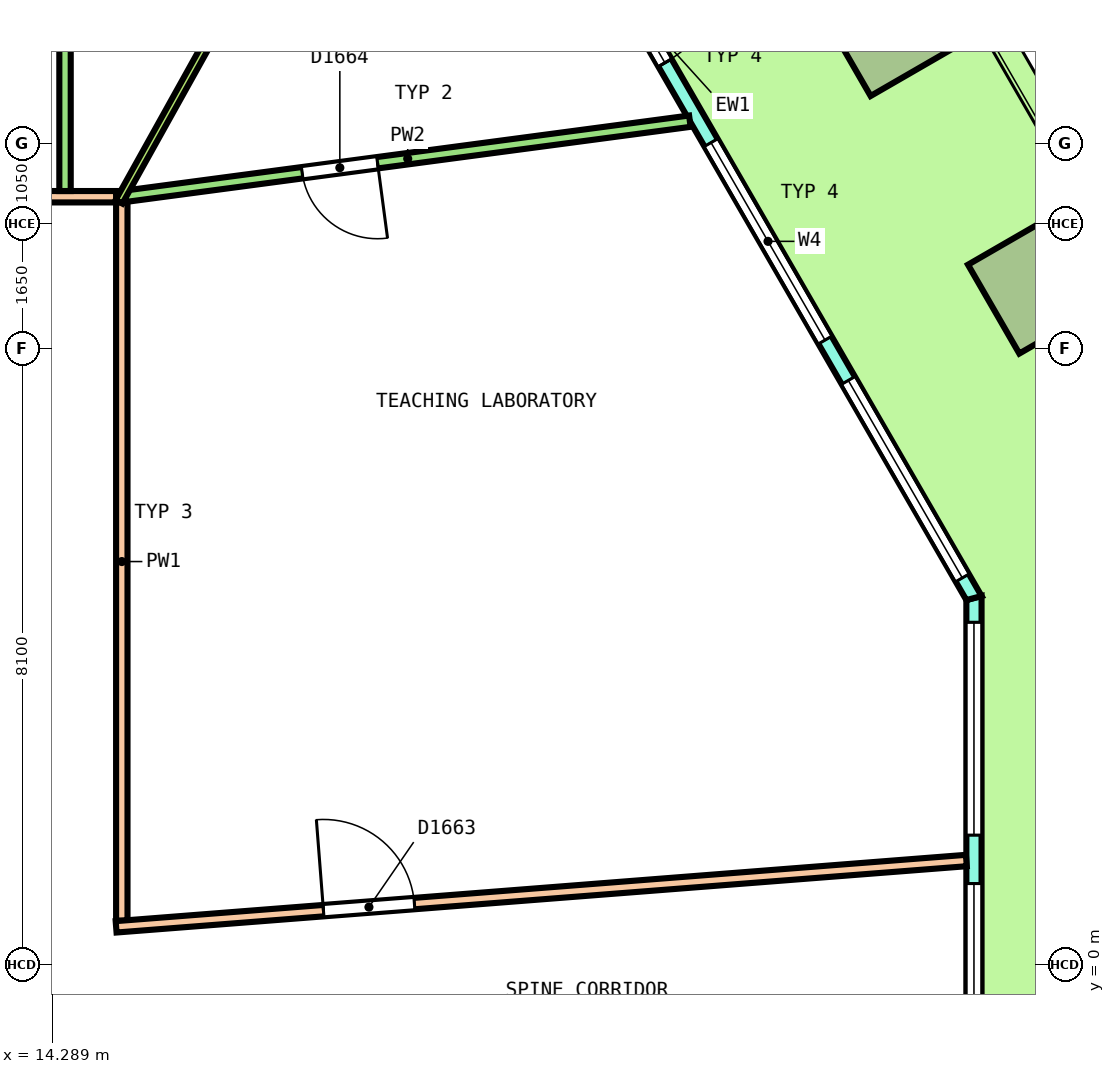
"""IFC4 building model, lengths in metres.
Left out: names, types, materials, properties, quantities, classifications, styles, units other than length and angle.
Written with IfcOpenShell. Run it as: python <this file> out.ifc"""

import sys

from ifc_helpers import new_model, si_unit, direction, frame, frame_2d, origin, origin_2d, place, context, subcontext, project, spatial, polyline, rectangle, outline, extrude, element, fill, save


model = new_model("IFC4")
c1 = context("Model", 3, precision=1e-05, world=origin(), true_north=direction((0.0, 1.0)))
c2 = subcontext(c1, "Body", "Model", "MODEL_VIEW")
j1 = project(units=[si_unit("LENGTHUNIT", "METRE"), si_unit("PLANEANGLEUNIT", "RADIAN")], contexts=[c1])
p1 = place(None, origin())
s1 = spatial("IfcSite", under=j1, at=p1, CompositionType="ELEMENT")
p2 = place(p1, origin())
s2 = spatial("IfcBuilding", under=s1, at=p2, CompositionType="ELEMENT")
p3 = place(p2, frame((0.0, 0.0, 130.8)))
s3 = spatial("IfcBuildingStorey", under=s2, at=p3, CompositionType="ELEMENT", Elevation=130.8)
for number, where, z_axis, x_axis in (
    (1, (27.255, 8.959, 0.0), (0.0, 0.0, 1.0), (-0.5, 0.866, 0.0)),
    (2, (25.299, 12.347, 0.0), (0.0, 0.0, 1.0), (-0.5, 0.866, 0.0)),
):
    element("IfcColumn", number, at=place(p3, frame(where, z_axis=z_axis, x_axis=x_axis)), inside=s3, PredefinedType="COLUMN", context=c2, shape_type="SweptSolid", body=[
        extrude(rectangle(XDim=1.35, YDim=1.35, at=origin_2d()), origin(), (0.0, 0.0, 1.0), 4.04),
    ])
p4 = place(p3, frame((26.411, -2.055, 0.0), z_axis=(0.0, 0.0, 1.0), x_axis=(0.0, 1.0, 0.0)))
e3 = element("IfcWall", 3, at=p4, inside=s3, PredefinedType="SOLIDWALL", context=c2, shape_type="SweptSolid", body=[
    extrude(outline(polyline([(-0.027, -0.1), (1.128, -0.1), (2.283, -0.1), (3.438, -0.1), (4.592, -0.1), (5.747, -0.1), (6.902, -0.1), (6.848, 0.1), (5.711, 0.1), (4.574, 0.1), (3.438, 0.1), (2.301, 0.1), (1.164, 0.1), (0.027, 0.1), (-0.027, -0.1)])), origin(), (0.0, 0.0, 1.0), 4.1),
])
p5 = place(p4, frame((0.319, 0.0, 0.1)))
e4 = element("IfcOpeningElement", 4, at=p5, cuts=e3, PredefinedType="OPENING", context=c2, shape_type="SweptSolid", body=[
    extrude(rectangle(XDim=2.8, YDim=2.9, at=frame_2d((1.4, 1.45))), frame((0.0, 0.11, 0.0), z_axis=(0.0, -1.0, 0.0), x_axis=(1.0, 0.0, 0.0)), (0.0, 0.0, 1.0), 0.22),
])
p6 = place(p4, frame((3.756, 0.0, 0.1)))
e5 = element("IfcOpeningElement", 5, at=p6, cuts=e3, PredefinedType="OPENING", context=c2, shape_type="SweptSolid", body=[
    extrude(rectangle(XDim=2.8, YDim=2.9, at=frame_2d((1.4, 1.45))), frame((0.0, 0.11, 0.0), z_axis=(0.0, -1.0, 0.0), x_axis=(1.0, 0.0, 0.0)), (0.0, 0.0, 1.0), 0.22),
])
p7 = place(p3, frame((26.411, 4.82, 0.0), z_axis=(0.0, 0.0, 1.0), x_axis=(-0.500000137386, 0.866025324465, 0.0)))
e6 = element("IfcWall", 6, at=p7, inside=s3, PredefinedType="SOLIDWALL", context=c2, shape_type="SweptSolid", body=[
    extrude(outline(polyline([(-0.027, -0.1), (0.979, -0.1), (1.986, -0.1), (2.992, -0.1), (3.999, -0.1), (5.005, -0.1), (6.012, -0.1), (7.018, -0.1), (8.025, -0.1), (9.031, -0.1), (10.038, -0.1), (11.044, -0.1), (12.051, -0.1), (13.057, -0.1), (14.063, -0.1), (15.07, -0.1), (16.076, -0.1), (17.083, -0.1), (18.089, -0.1), (18.036, 0.1), (17.035, 0.1), (16.035, 0.1), (15.034, 0.1), (14.034, 0.1), (13.033, 0.1), (12.033, 0.1), (11.032, 0.1), (10.032, 0.1), (9.031, 0.1), (8.031, 0.1), (7.03, 0.1), (6.03, 0.1), (5.029, 0.1), (4.029, 0.1), (3.028, 0.1), (2.028, 0.1), (1.027, 0.1), (0.027, 0.1), (-0.027, -0.1)])), origin(), (0.0, 0.0, 1.0), 4.1),
])
p8 = place(p7, frame((0.306, 0.0, 0.1)))
e7 = element("IfcOpeningElement", 7, at=p8, cuts=e6, PredefinedType="OPENING", context=c2, shape_type="SweptSolid", body=[
    extrude(rectangle(XDim=3.0, YDim=2.9, at=frame_2d((1.5, 1.45))), frame((0.0, 0.11, 0.0), z_axis=(0.0, -1.0, 0.0), x_axis=(1.0, 0.0, 0.0)), (0.0, 0.0, 1.0), 0.22),
])
p9 = place(p7, frame((3.919, 0.0, 0.1)))
e8 = element("IfcOpeningElement", 8, at=p9, cuts=e6, PredefinedType="OPENING", context=c2, shape_type="SweptSolid", body=[
    extrude(rectangle(XDim=3.0, YDim=2.9, at=frame_2d((1.5, 1.45))), frame((0.0, 0.11, 0.0), z_axis=(0.0, -1.0, 0.0), x_axis=(1.0, 0.0, 0.0)), (0.0, 0.0, 1.0), 0.22),
])
p10 = place(p7, frame((8.131, 0.0, 0.0)))
e9 = element("IfcOpeningElement", 9, at=p10, cuts=e6, PredefinedType="OPENING", context=c2, shape_type="SweptSolid", body=[
    extrude(rectangle(XDim=1.8, YDim=2.4, at=frame_2d((0.9, 1.2))), frame((0.0, 0.11, 0.0), z_axis=(0.0, -1.0, 0.0), x_axis=(1.0, 0.0, 0.0)), (0.0, 0.0, 1.0), 0.22),
])
p11 = place(p7, frame((8.131, 0.0, 2.55)))
e10 = element("IfcOpeningElement", 10, at=p11, cuts=e6, PredefinedType="OPENING", context=c2, shape_type="SweptSolid", body=[
    extrude(rectangle(XDim=1.8, YDim=0.45, at=frame_2d((0.9, 0.225))), frame((0.0, 0.11, 0.0), z_axis=(0.0, -1.0, 0.0), x_axis=(1.0, 0.0, 0.0)), (0.0, 0.0, 1.0), 0.22),
])
p12 = place(p7, frame((11.144, 0.0, 0.1)))
e11 = element("IfcOpeningElement", 11, at=p12, cuts=e6, PredefinedType="OPENING", context=c2, shape_type="SweptSolid", body=[
    extrude(rectangle(XDim=3.0, YDim=2.9, at=frame_2d((1.5, 1.45))), frame((0.0, 0.11, 0.0), z_axis=(0.0, -1.0, 0.0), x_axis=(1.0, 0.0, 0.0)), (0.0, 0.0, 1.0), 0.22),
])
p13 = place(p7, frame((14.756, 0.0, 0.1)))
e12 = element("IfcOpeningElement", 12, at=p13, cuts=e6, PredefinedType="OPENING", context=c2, shape_type="SweptSolid", body=[
    extrude(rectangle(XDim=3.0, YDim=2.9, at=frame_2d((1.5, 1.45))), frame((0.0, 0.11, 0.0), z_axis=(0.0, -1.0, 0.0), x_axis=(1.0, 0.0, 0.0)), (0.0, 0.0, 1.0), 0.22),
])
p14 = place(p3, frame((15.2, 0.576, 0.0), z_axis=(0.0, 0.0, 1.0), x_axis=(0.0, 1.0, 0.0)))
e13 = element("IfcWall", 13, at=p14, inside=s3, PredefinedType="PARTITIONING", context=c2, shape_type="SweptSolid", body=[
    extrude(rectangle(XDim=9.449, YDim=0.15, at=frame_2d((4.725, 0.0))), origin(), (0.0, 0.0, 1.0), 3.05),
])
p15 = place(p3, frame((-15.125, 10.1, 0.0), z_axis=(0.0, 0.0, 1.0), x_axis=(1.0, 0.0, 0.0)))
e14 = element("IfcWall", 14, at=p15, inside=s3, PredefinedType="PARTITIONING", context=c2, shape_type="SweptSolid", body=[
    extrude(rectangle(XDim=30.25, YDim=0.15, at=frame_2d((15.125, 0.0))), origin(), (0.0, 0.0, 1.0), 3.05),
])
p16 = place(p15, frame((16.895, 0.0, 0.0)))
e15 = element("IfcOpeningElement", 15, at=p16, cuts=e14, PredefinedType="OPENING", context=c2, shape_type="SweptSolid", body=[
    extrude(rectangle(XDim=1.2, YDim=2.1, at=frame_2d((0.6, 1.05))), frame((0.0, 0.085, 0.0), z_axis=(0.0, -1.0, 0.0), x_axis=(1.0, 0.0, 0.0)), (0.0, 0.0, 1.0), 0.17),
])
p17 = place(p15, frame((6.564, 0.0, 0.0)))
e16 = element("IfcOpeningElement", 16, at=p17, cuts=e14, PredefinedType="OPENING", context=c2, shape_type="SweptSolid", body=[
    extrude(rectangle(XDim=1.2, YDim=2.1, at=frame_2d((0.6, 1.05))), frame((0.0, 0.085, 0.0), z_axis=(0.0, -1.0, 0.0), x_axis=(1.0, 0.0, 0.0)), (0.0, 0.0, 1.0), 0.17),
])
p18 = place(p15, frame((1.476, 0.0, 0.0)))
e17 = element("IfcOpeningElement", 17, at=p18, cuts=e14, PredefinedType="OPENING", context=c2, shape_type="SweptSolid", body=[
    extrude(rectangle(XDim=1.2, YDim=2.1, at=frame_2d((0.6, 1.05))), frame((0.0, 0.085, 0.0), z_axis=(0.0, -1.0, 0.0), x_axis=(1.0, 0.0, 0.0)), (0.0, 0.0, 1.0), 0.17),
])
p19 = place(p3, frame((15.125, 0.495, 0.0), z_axis=(0.0, 0.0, 1.0), x_axis=(0.996973035288, 0.07774809907, 0.0)))
e18 = element("IfcWall", 18, at=p19, inside=s3, PredefinedType="PARTITIONING", context=c2, shape_type="SweptSolid", body=[
    extrude(rectangle(XDim=11.22, YDim=0.15, at=frame_2d((5.61, 0.0))), origin(), (0.0, 0.0, 1.0), 3.05),
])
p20 = place(p19, frame((2.736, 0.0, 0.0)))
e19 = element("IfcOpeningElement", 19, at=p20, cuts=e18, PredefinedType="OPENING", context=c2, shape_type="SweptSolid", body=[
    extrude(rectangle(XDim=1.2, YDim=2.1, at=frame_2d((0.6, 1.05))), frame((0.0, 0.085, 0.0), z_axis=(0.0, -1.0, 0.0), x_axis=(1.0, 0.0, 0.0)), (0.0, 0.0, 1.0), 0.17),
])
p21 = place(p3, frame((15.25, 10.107, 0.0), z_axis=(0.0, 0.0, 1.0), x_axis=(0.991272259153, 0.131830604315, 0.0)))
e20 = element("IfcWall", 20, at=p21, inside=s3, PredefinedType="PARTITIONING", context=c2, shape_type="SweptSolid", body=[
    extrude(rectangle(XDim=7.489, YDim=0.15, at=frame_2d((3.745, 0.0))), origin(), (0.0, 0.0, 1.0), 3.05),
])
p22 = place(p21, frame((2.344, 0.0, 0.0)))
e21 = element("IfcOpeningElement", 21, at=p22, cuts=e20, PredefinedType="OPENING", context=c2, shape_type="SweptSolid", body=[
    extrude(rectangle(XDim=1.0, YDim=2.1, at=frame_2d((0.5, 1.05))), frame((0.0, 0.085, 0.0), z_axis=(0.0, -1.0, 0.0), x_axis=(1.0, 0.0, 0.0)), (0.0, 0.0, 1.0), 0.17),
])
p23 = place(p3, frame((14.453, 10.175, 0.0), z_axis=(0.0, 0.0, 1.0), x_axis=(0.0, 1.0, 0.0)))
e22 = element("IfcWall", 22, at=p23, inside=s3, PredefinedType="PARTITIONING", context=c2, shape_type="SweptSolid", body=[
    extrude(rectangle(XDim=11.862, YDim=0.15, at=frame_2d((5.931, 0.0))), origin(), (0.0, 0.0, 1.0), 3.05),
])
p24 = place(p3, frame((15.164, 10.034, 0.0), z_axis=(0.0, 0.0, 1.0), x_axis=(0.486568356271, 0.873642509655, 0.0)))
e23 = element("IfcWall", 23, at=p24, inside=s3, PredefinedType="PARTITIONING", context=c2, shape_type="SweptSolid", body=[
    extrude(rectangle(XDim=8.196, YDim=0.1, at=frame_2d((4.098, 0.0))), origin(), (0.0, 0.0, 1.0), 3.05),
])
p25 = place(p24, frame((3.635, 0.0, 0.0)))
e24 = element("IfcOpeningElement", 24, at=p25, cuts=e23, PredefinedType="OPENING", context=c2, shape_type="SweptSolid", body=[
    extrude(rectangle(XDim=1.0, YDim=2.1, at=frame_2d((0.5, 1.05))), frame((0.0, 0.06, 0.0), z_axis=(0.0, -1.0, 0.0), x_axis=(1.0, 0.0, 0.0)), (0.0, 0.0, 1.0), 0.12),
])
p26 = place(p5, origin())
e25 = element("IfcWindow", 25, at=p26, inside=s3, PartitioningType="SINGLE_PANEL", PredefinedType="WINDOW", context=c2, shape_type="SweptSolid", body=[
    extrude(rectangle(XDim=2.8, YDim=2.9, at=frame_2d((1.4, 1.45))), frame((0.0, 0.03, 0.0), z_axis=(0.0, -1.0, 0.0), x_axis=(1.0, 0.0, 0.0)), (0.0, 0.0, 1.0), 0.06),
])
fill(e4, e25)
p27 = place(p6, origin())
e26 = element("IfcWindow", 26, at=p27, inside=s3, PartitioningType="SINGLE_PANEL", PredefinedType="WINDOW", context=c2, shape_type="SweptSolid", body=[
    extrude(rectangle(XDim=2.8, YDim=2.9, at=frame_2d((1.4, 1.45))), frame((0.0, 0.03, 0.0), z_axis=(0.0, -1.0, 0.0), x_axis=(1.0, 0.0, 0.0)), (0.0, 0.0, 1.0), 0.06),
])
fill(e5, e26)
p28 = place(p8, origin())
e27 = element("IfcWindow", 27, at=p28, inside=s3, PartitioningType="SINGLE_PANEL", PredefinedType="WINDOW", context=c2, shape_type="SweptSolid", body=[
    extrude(rectangle(XDim=3.0, YDim=2.9, at=frame_2d((1.5, 1.45))), frame((0.0, 0.03, 0.0), z_axis=(0.0, -1.0, 0.0), x_axis=(1.0, 0.0, 0.0)), (0.0, 0.0, 1.0), 0.06),
])
fill(e7, e27)
p29 = place(p9, origin())
e28 = element("IfcWindow", 28, at=p29, inside=s3, PartitioningType="SINGLE_PANEL", PredefinedType="WINDOW", context=c2, shape_type="SweptSolid", body=[
    extrude(rectangle(XDim=3.0, YDim=2.9, at=frame_2d((1.5, 1.45))), frame((0.0, 0.03, 0.0), z_axis=(0.0, -1.0, 0.0), x_axis=(1.0, 0.0, 0.0)), (0.0, 0.0, 1.0), 0.06),
])
fill(e8, e28)
p30 = place(p10, origin())
e29 = element("IfcDoor", 29, at=p30, inside=s3, OperationType="DOUBLE_DOOR_SINGLE_SWING", PredefinedType="DOOR", context=c2, shape_type="SweptSolid", body=[
    extrude(rectangle(XDim=1.8, YDim=2.4, at=frame_2d((0.9, 1.2))), frame((0.0, 0.025, 0.0), z_axis=(0.0, -1.0, 0.0), x_axis=(1.0, 0.0, 0.0)), (0.0, 0.0, 1.0), 0.05),
])
fill(e9, e29)
p31 = place(p11, origin())
e30 = element("IfcWindow", 30, at=p31, inside=s3, PartitioningType="SINGLE_PANEL", PredefinedType="WINDOW", context=c2, shape_type="SweptSolid", body=[
    extrude(rectangle(XDim=1.8, YDim=0.45, at=frame_2d((0.9, 0.225))), frame((0.0, 0.03, 0.0), z_axis=(0.0, -1.0, 0.0), x_axis=(1.0, 0.0, 0.0)), (0.0, 0.0, 1.0), 0.06),
])
fill(e10, e30)
p32 = place(p20, origin())
e31 = element("IfcDoor", 31, at=p32, inside=s3, OperationType="DOUBLE_DOOR_SINGLE_SWING", PredefinedType="DOOR", context=c2, shape_type="SweptSolid", body=[
    extrude(rectangle(XDim=1.2, YDim=2.1, at=frame_2d((0.6, 1.05))), frame((0.0, 0.025, 0.0), z_axis=(0.0, -1.0, 0.0), x_axis=(1.0, 0.0, 0.0)), (0.0, 0.0, 1.0), 0.05),
])
fill(e19, e31)
p33 = place(p22, origin())
e32 = element("IfcDoor", 32, at=p33, inside=s3, OperationType="SINGLE_SWING_RIGHT", PredefinedType="DOOR", context=c2, shape_type="SweptSolid", body=[
    extrude(rectangle(XDim=1.0, YDim=2.1, at=frame_2d((0.5, 1.05))), frame((0.0, 0.025, 0.0), z_axis=(0.0, -1.0, 0.0), x_axis=(1.0, 0.0, 0.0)), (0.0, 0.0, 1.0), 0.05),
])
fill(e21, e32)
save(model, sys.argv[1])
